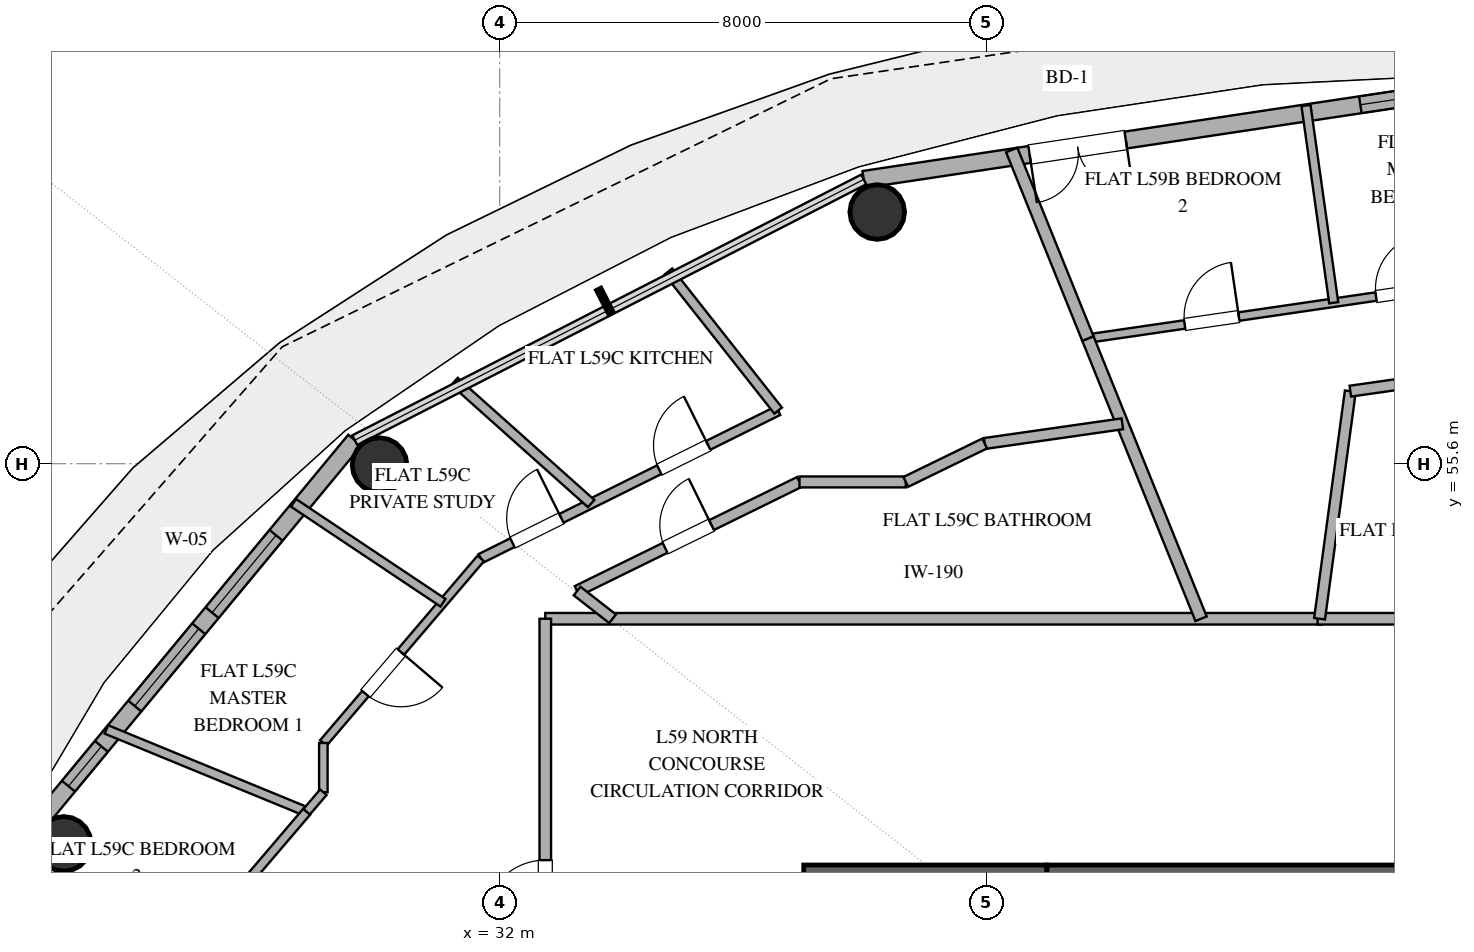
"""IFC4 building model, lengths in metres.
Left out: names, types, materials, properties, quantities, classifications, styles, units other than length and angle.
Written with IfcOpenShell. Run it as: python <this file> out.ifc"""

import sys

from ifc_helpers import new_model, si_unit, direction, frame, frame_2d, origin, origin_2d, place, context, subcontext, project, spatial, rectangle, hollow_circle, extrude, element, fill, save


model = new_model("IFC4")
c1 = context("Model", 3, precision=1e-05, world=origin(), true_north=direction((0.0, 1.0)))
c2 = subcontext(c1, "Body", "Model", "MODEL_VIEW")
j1 = project(units=[si_unit("LENGTHUNIT", "METRE"), si_unit("PLANEANGLEUNIT", "RADIAN")], contexts=[c1])
p1 = place(None, origin())
s1 = spatial("IfcSite", under=j1, at=p1, CompositionType="ELEMENT")
p2 = place(p1, origin())
s2 = spatial("IfcBuilding", under=s1, at=p2, CompositionType="ELEMENT")
p3 = place(p2, frame((0.0, 0.0, 231.6)))
s3 = spatial("IfcBuildingStorey", under=s2, at=p3, CompositionType="ELEMENT", Elevation=231.6)
p4 = place(p3, frame((37.0, 48.8, 0.0), z_axis=(0.0, 0.0, 1.0), x_axis=(1.0, 0.0, 0.0)))
e1 = element("IfcWall", 1, at=p4, inside=s3, PredefinedType="SHEAR", context=c2, shape_type="SweptSolid", body=[
    extrude(rectangle(XDim=4.0, YDim=0.4, at=frame_2d((2.0, 0.0))), origin(), (0.0, 0.0, 1.0), 3.36),
])
p5 = place(p3, frame((41.0, 48.8, 0.0), z_axis=(0.0, 0.0, 1.0), x_axis=(1.0, 0.0, 0.0)))
e2 = element("IfcWall", 2, at=p5, inside=s3, PredefinedType="SHEAR", context=c2, shape_type="SweptSolid", body=[
    extrude(rectangle(XDim=14.0, YDim=0.4, at=frame_2d((7.0, 0.0))), origin(), (0.0, 0.0, 1.0), 3.36),
])
p6 = place(p5, frame((6.1, 0.0, 0.0)))
e3 = element("IfcOpeningElement", 3, at=p6, cuts=e2, PredefinedType="OPENING", context=c2, shape_type="SweptSolid", body=[
    extrude(rectangle(XDim=1.8, YDim=2.25, at=frame_2d((0.9, 1.125))), frame((0.0, 0.21, 0.0), z_axis=(0.0, -1.0, 0.0), x_axis=(1.0, 0.0, 0.0)), (0.0, 0.0, 1.0), 0.42),
])
for number, where, z_axis, x_axis in (
    (4, (38.209, 59.739, 0.0), (0.0, 0.0, 1.0), (1.0, 0.0, 0.0)),
    (5, (30.025, 55.576, 0.0), (0.0, 0.0, 1.0), (1.0, 0.0, 0.0)),
    (6, (24.831, 49.347, 0.0), (0.0, 0.0, 1.0), (1.0, 0.0, 0.0)),
):
    element("IfcColumn", number, at=place(p3, frame(where, z_axis=z_axis, x_axis=x_axis)), inside=s3, PredefinedType="COLUMN", context=c2, shape_type="SweptSolid", body=[
        extrude(hollow_circle(Radius=0.45, WallThickness=0.025, at=origin_2d()), origin(), (0.0, 0.0, 1.0), 3.36),
    ])
p7 = place(p3, frame((48.0, 61.78, 0.0), z_axis=(0.0, 0.0, 1.0), x_axis=(-0.988882522213, -0.148698881169, 0.0)))
e7 = element("IfcWall", 7, at=p7, inside=s3, PredefinedType="SOLIDWALL", context=c2, shape_type="SweptSolid", body=[
    extrude(rectangle(XDim=10.125, YDim=0.28, at=frame_2d((5.062, 0.0))), origin(), (0.0, 0.0, 1.0), 3.36),
])
p8 = place(p7, frame((5.767, 0.0, 0.0)))
e8 = element("IfcOpeningElement", 8, at=p8, cuts=e7, PredefinedType="OPENING", context=c2, shape_type="SweptSolid", body=[
    extrude(rectangle(XDim=1.6, YDim=2.25, at=frame_2d((0.8, 1.125))), frame((0.0, 0.15, 0.0), z_axis=(0.0, -1.0, 0.0), x_axis=(1.0, 0.0, 0.0)), (0.0, 0.0, 1.0), 0.3),
])
p9 = place(p7, frame((0.866, 0.0, 0.85)))
e9 = element("IfcOpeningElement", 9, at=p9, cuts=e7, PredefinedType="OPENING", context=c2, shape_type="SweptSolid", body=[
    extrude(rectangle(XDim=1.0, YDim=1.8, at=frame_2d((0.5, 0.9))), frame((0.0, 0.15, 0.0), z_axis=(0.0, -1.0, 0.0), x_axis=(1.0, 0.0, 0.0)), (0.0, 0.0, 1.0), 0.3),
])
p10 = place(p3, frame((29.617, 55.987, 0.0), z_axis=(0.0, 0.0, 1.0), x_axis=(-0.63761509934, -0.770355103243, 0.0)))
e10 = element("IfcWall", 10, at=p10, inside=s3, PredefinedType="SOLIDWALL", context=c2, shape_type="SweptSolid", body=[
    extrude(rectangle(XDim=8.33, YDim=0.28, at=frame_2d((4.165, 0.0))), origin(), (0.0, 0.0, 1.0), 3.36),
])
p11 = place(p10, frame((2.031, 0.0, 0.85)))
e11 = element("IfcOpeningElement", 11, at=p11, cuts=e10, PredefinedType="OPENING", context=c2, shape_type="SweptSolid", body=[
    extrude(rectangle(XDim=1.65, YDim=2.0, at=frame_2d((0.825, 1.0))), frame((0.0, 0.15, 0.0), z_axis=(0.0, -1.0, 0.0), x_axis=(1.0, 0.0, 0.0)), (0.0, 0.0, 1.0), 0.3),
])
p12 = place(p10, frame((4.025, 0.0, 0.85)))
e12 = element("IfcOpeningElement", 12, at=p12, cuts=e10, PredefinedType="OPENING", context=c2, shape_type="SweptSolid", body=[
    extrude(rectangle(XDim=1.65, YDim=2.0, at=frame_2d((0.825, 1.0))), frame((0.0, 0.15, 0.0), z_axis=(0.0, -1.0, 0.0), x_axis=(1.0, 0.0, 0.0)), (0.0, 0.0, 1.0), 0.3),
])
p13 = place(p10, frame((6.536, 0.0, 0.85)))
e13 = element("IfcOpeningElement", 13, at=p13, cuts=e10, PredefinedType="OPENING", context=c2, shape_type="SweptSolid", body=[
    extrude(rectangle(XDim=0.85, YDim=1.8, at=frame_2d((0.425, 0.9))), frame((0.0, 0.15, 0.0), z_axis=(0.0, -1.0, 0.0), x_axis=(1.0, 0.0, 0.0)), (0.0, 0.0, 1.0), 0.3),
])
p14 = place(p3, frame((32.75, 53.05, 0.0), z_axis=(0.0, 0.0, 1.0), x_axis=(1.0, 0.0, 0.0)))
e14 = element("IfcWall", 14, at=p14, inside=s3, PredefinedType="PARTITIONING", context=c2, shape_type="SweptSolid", body=[
    extrude(rectangle(XDim=12.766, YDim=0.19, at=frame_2d((6.383, 0.0))), origin(), (0.0, 0.0, 1.0), 2.72),
])
p15 = place(p3, frame((32.75, 42.243, 0.0), z_axis=(0.0, 0.0, 1.0), x_axis=(0.0, 1.0, 0.0)))
e15 = element("IfcWall", 15, at=p15, inside=s3, PredefinedType="PARTITIONING", context=c2, shape_type="SweptSolid", body=[
    extrude(rectangle(XDim=10.807, YDim=0.19, at=frame_2d((5.404, 0.0))), origin(), (0.0, 0.0, 1.0), 2.72),
])
p16 = place(p15, frame((5.837, 0.0, 0.0)))
e16 = element("IfcOpeningElement", 16, at=p16, cuts=e15, PredefinedType="OPENING", context=c2, shape_type="SweptSolid", body=[
    extrude(rectangle(XDim=1.0, YDim=2.2, at=frame_2d((0.5, 1.1))), frame((0.0, 0.105, 0.0), z_axis=(0.0, -1.0, 0.0), x_axis=(1.0, 0.0, 0.0)), (0.0, 0.0, 1.0), 0.21),
])
p17 = place(p3, frame((45.452, 53.05, 0.0), z_axis=(0.0, 0.0, 1.0), x_axis=(1.0, 0.0, 0.0)))
e17 = element("IfcWall", 17, at=p17, inside=s3, PredefinedType="PARTITIONING", context=c2, shape_type="SweptSolid", body=[
    extrude(rectangle(XDim=17.798, YDim=0.19, at=frame_2d((8.899, 0.0))), origin(), (0.0, 0.0, 1.0), 2.72),
])
p18 = place(p17, frame((13.381, 0.0, 0.0)))
e18 = element("IfcOpeningElement", 18, at=p18, cuts=e17, PredefinedType="OPENING", context=c2, shape_type="SweptSolid", body=[
    extrude(rectangle(XDim=1.0, YDim=2.2, at=frame_2d((0.5, 1.1))), frame((0.0, 0.105, 0.0), z_axis=(0.0, -1.0, 0.0), x_axis=(1.0, 0.0, 0.0)), (0.0, 0.0, 1.0), 0.21),
])
p19 = place(p17, frame((6.359, 0.0, 0.0)))
e19 = element("IfcOpeningElement", 19, at=p19, cuts=e17, PredefinedType="OPENING", context=c2, shape_type="SweptSolid", body=[
    extrude(rectangle(XDim=1.0, YDim=2.2, at=frame_2d((0.5, 1.1))), frame((0.0, 0.105, 0.0), z_axis=(0.0, -1.0, 0.0), x_axis=(1.0, 0.0, 0.0)), (0.0, 0.0, 1.0), 0.21),
])
p20 = place(p3, frame((41.674, 57.657, 0.0), z_axis=(0.0, 0.0, 1.0), x_axis=(0.989537524877, 0.144275732054, 0.0)))
e20 = element("IfcWall", 20, at=p20, inside=s3, PredefinedType="PARTITIONING", context=c2, shape_type="SweptSolid", body=[
    extrude(rectangle(XDim=6.393, YDim=0.14, at=frame_2d((3.197, 0.0))), origin(), (0.0, 0.0, 1.0), 2.72),
])
p21 = place(p20, frame((1.609, 0.0, 0.0)))
e21 = element("IfcOpeningElement", 21, at=p21, cuts=e20, PredefinedType="OPENING", context=c2, shape_type="SweptSolid", body=[
    extrude(rectangle(XDim=0.9, YDim=2.1, at=frame_2d((0.45, 1.05))), frame((0.0, 0.08, 0.0), z_axis=(0.0, -1.0, 0.0), x_axis=(1.0, 0.0, 0.0)), (0.0, 0.0, 1.0), 0.16),
])
p22 = place(p20, frame((4.789, 0.0, 0.0)))
e22 = element("IfcOpeningElement", 22, at=p22, cuts=e20, PredefinedType="OPENING", context=c2, shape_type="SweptSolid", body=[
    extrude(rectangle(XDim=0.9, YDim=2.1, at=frame_2d((0.45, 1.05))), frame((0.0, 0.08, 0.0), z_axis=(0.0, -1.0, 0.0), x_axis=(1.0, 0.0, 0.0)), (0.0, 0.0, 1.0), 0.16),
])
p23 = place(p3, frame((33.273, 53.506, 0.0), z_axis=(0.0, 0.0, 1.0), x_axis=(0.89778136281, 0.440441397454, 0.0)))
e23 = element("IfcWall", 23, at=p23, inside=s3, PredefinedType="PLUMBINGWALL", context=c2, shape_type="SweptSolid", body=[
    extrude(rectangle(XDim=4.074, YDim=0.18, at=frame_2d((2.037, 0.0))), origin(), (0.0, 0.0, 1.0), 2.72),
])
p24 = place(p23, frame((1.612, 0.0, 0.0)))
e24 = element("IfcOpeningElement", 24, at=p24, cuts=e23, PredefinedType="OPENING", context=c2, shape_type="SweptSolid", body=[
    extrude(rectangle(XDim=0.85, YDim=2.1, at=frame_2d((0.425, 1.05))), frame((0.0, 0.1, 0.0), z_axis=(0.0, -1.0, 0.0), x_axis=(1.0, 0.0, 0.0)), (0.0, 0.0, 1.0), 0.2),
])
p25 = place(p3, frame((45.99, 56.792, 0.0), z_axis=(0.0, 0.0, 1.0), x_axis=(-0.134013985284, -0.990979440628, 0.0)))
e25 = element("IfcWall", 25, at=p25, inside=s3, PredefinedType="PLUMBINGWALL", context=c2, shape_type="SweptSolid", body=[
    extrude(rectangle(XDim=3.777, YDim=0.18, at=frame_2d((1.888, 0.0))), origin(), (0.0, 0.0, 1.0), 2.72),
])
p26 = place(p3, frame((25.531, 51.229, 0.0), z_axis=(0.0, 0.0, 1.0), x_axis=(0.925009924445, -0.37994294266, 0.0)))
e26 = element("IfcWall", 26, at=p26, inside=s3, PredefinedType="PARTITIONING", context=c2, shape_type="SweptSolid", body=[
    extrude(rectangle(XDim=3.562, YDim=0.15, at=frame_2d((1.781, 0.0))), origin(), (0.0, 0.0, 1.0), 2.72),
])
p27 = place(p3, frame((31.689, 54.042, 0.0), z_axis=(0.0, 0.0, 1.0), x_axis=(0.895479575413, 0.445102606168, 0.0)))
e27 = element("IfcWall", 27, at=p27, inside=s3, PredefinedType="PLUMBINGWALL", context=c2, shape_type="SweptSolid", body=[
    extrude(rectangle(XDim=5.462, YDim=0.16, at=frame_2d((2.731, 0.0))), origin(), (0.0, 0.0, 1.0), 2.72),
])
p28 = place(p27, frame((3.278, 0.0, 0.0)))
e28 = element("IfcOpeningElement", 28, at=p28, cuts=e27, PredefinedType="OPENING", context=c2, shape_type="SweptSolid", body=[
    extrude(rectangle(XDim=0.9, YDim=2.1, at=frame_2d((0.45, 1.05))), frame((0.0, 0.09, 0.0), z_axis=(0.0, -1.0, 0.0), x_axis=(1.0, 0.0, 0.0)), (0.0, 0.0, 1.0), 0.18),
])
p29 = place(p27, frame((0.581, 0.0, 0.0)))
e29 = element("IfcOpeningElement", 29, at=p29, cuts=e27, PredefinedType="OPENING", context=c2, shape_type="SweptSolid", body=[
    extrude(rectangle(XDim=0.9, YDim=2.1, at=frame_2d((0.45, 1.05))), frame((0.0, 0.09, 0.0), z_axis=(0.0, -1.0, 0.0), x_axis=(1.0, 0.0, 0.0)), (0.0, 0.0, 1.0), 0.18),
])
p30 = place(p3, frame((41.674, 57.657, 0.0), z_axis=(0.0, 0.0, 1.0), x_axis=(0.374573524941, -0.927197214412, 0.0)))
e30 = element("IfcWall", 30, at=p30, inside=s3, PredefinedType="PARTITIONING", context=c2, shape_type="SweptSolid", body=[
    extrude(rectangle(XDim=4.969, YDim=0.2, at=frame_2d((2.485, 0.0))), origin(), (0.0, 0.0, 1.0), 2.72),
])
p31 = place(p3, frame((41.674, 57.657, 0.0), z_axis=(0.0, 0.0, 1.0), x_axis=(-0.374572886439, 0.927197472357, 0.0)))
e31 = element("IfcWall", 31, at=p31, inside=s3, PredefinedType="PARTITIONING", context=c2, shape_type="SweptSolid", body=[
    extrude(rectangle(XDim=3.344, YDim=0.2, at=frame_2d((1.672, 0.0))), origin(), (0.0, 0.0, 1.0), 2.72),
])
p32 = place(p3, frame((45.717, 58.247, 0.0), z_axis=(0.0, 0.0, 1.0), x_axis=(-0.139134872395, 0.990273440664, 0.0)))
e32 = element("IfcWall", 32, at=p32, inside=s3, PredefinedType="PARTITIONING", context=c2, shape_type="SweptSolid", body=[
    extrude(rectangle(XDim=3.274, YDim=0.15, at=frame_2d((1.637, 0.0))), origin(), (0.0, 0.0, 1.0), 2.72),
])
p33 = place(p3, frame((31.689, 54.042, 0.0), z_axis=(0.0, 0.0, 1.0), x_axis=(-0.648985159088, -0.760801066826, 0.0)))
e33 = element("IfcWall", 33, at=p33, inside=s3, PredefinedType="PARTITIONING", context=c2, shape_type="SweptSolid", body=[
    extrude(rectangle(XDim=3.989, YDim=0.14, at=frame_2d((1.995, 0.0))), origin(), (0.0, 0.0, 1.0), 2.72),
])
p34 = place(p33, frame((2.023, 0.0, 0.0)))
e34 = element("IfcOpeningElement", 34, at=p34, cuts=e33, PredefinedType="OPENING", context=c2, shape_type="SweptSolid", body=[
    extrude(rectangle(XDim=0.9, YDim=2.1, at=frame_2d((0.45, 1.05))), frame((0.0, 0.08, 0.0), z_axis=(0.0, -1.0, 0.0), x_axis=(1.0, 0.0, 0.0)), (0.0, 0.0, 1.0), 0.16),
])
p35 = place(p3, frame((33.505, 54.945, 0.0), z_axis=(0.0, 0.0, 1.0), x_axis=(-0.745914664094, 0.66604152565, 0.0)))
e35 = element("IfcWall", 35, at=p35, inside=s3, PredefinedType="PLUMBINGWALL", context=c2, shape_type="SweptSolid", body=[
    extrude(rectangle(XDim=3.014, YDim=0.16, at=frame_2d((1.507, 0.0))), origin(), (0.0, 0.0, 1.0), 2.72),
])
p36 = place(p3, frame((28.609, 54.956, 0.0), z_axis=(0.0, 0.0, 1.0), x_axis=(0.831478101563, -0.555557527733, 0.0)))
e36 = element("IfcWall", 36, at=p36, inside=s3, PredefinedType="PARTITIONING", context=c2, shape_type="SweptSolid", body=[
    extrude(rectangle(XDim=2.956, YDim=0.15, at=frame_2d((1.478, 0.0))), origin(), (0.0, 0.0, 1.0), 2.72),
])
p37 = place(p3, frame((36.58, 56.473, 0.0), z_axis=(0.0, 0.0, 1.0), x_axis=(-0.619378047354, 0.785092882694, 0.0)))
e37 = element("IfcWall", 37, at=p37, inside=s3, PredefinedType="PLUMBINGWALL", context=c2, shape_type="SweptSolid", body=[
    extrude(rectangle(XDim=2.914, YDim=0.16, at=frame_2d((1.457, 0.0))), origin(), (0.0, 0.0, 1.0), 2.72),
])
p38 = place(p3, frame((39.976, 55.932, 0.0), z_axis=(0.0, 0.0, 1.0), x_axis=(0.989917445937, 0.141645509032, 0.0)))
e38 = element("IfcWall", 38, at=p38, inside=s3, PredefinedType="PLUMBINGWALL", context=c2, shape_type="SweptSolid", body=[
    extrude(rectangle(XDim=2.287, YDim=0.18, at=frame_2d((1.144, 0.0))), origin(), (0.0, 0.0, 1.0), 2.72),
])
p39 = place(p3, frame((48.0, 57.08, 0.0), z_axis=(0.0, 0.0, 1.0), x_axis=(-0.989918207634, -0.141640185666, 0.0)))
e39 = element("IfcWall", 39, at=p39, inside=s3, PredefinedType="PLUMBINGWALL", context=c2, shape_type="SweptSolid", body=[
    extrude(rectangle(XDim=2.031, YDim=0.18, at=frame_2d((1.015, 0.0))), origin(), (0.0, 0.0, 1.0), 2.72),
])
p40 = place(p3, frame((28.826, 49.876, 0.0), z_axis=(0.0, 0.0, 1.0), x_axis=(-0.649252114502, -0.760573265251, 0.0)))
e40 = element("IfcWall", 40, at=p40, inside=s3, PredefinedType="PARTITIONING", context=c2, shape_type="SweptSolid", body=[
    extrude(rectangle(XDim=2.013, YDim=0.15, at=frame_2d((1.007, 0.0))), origin(), (0.0, 0.0, 1.0), 2.72),
])
p41 = place(p3, frame((36.931, 55.3, 0.0), z_axis=(0.0, 0.0, 1.0), x_axis=(1.0, 0.0, 0.0)))
e41 = element("IfcWall", 41, at=p41, inside=s3, PredefinedType="PLUMBINGWALL", context=c2, shape_type="SweptSolid", body=[
    extrude(rectangle(XDim=1.748, YDim=0.18, at=frame_2d((0.874, 0.0))), origin(), (0.0, 0.0, 1.0), 2.72),
])
p42 = place(p3, frame((38.679, 55.3, 0.0), z_axis=(0.0, 0.0, 1.0), x_axis=(0.898916394035, 0.438120207861, 0.0)))
e42 = element("IfcWall", 42, at=p42, inside=s3, PredefinedType="PLUMBINGWALL", context=c2, shape_type="SweptSolid", body=[
    extrude(rectangle(XDim=1.443, YDim=0.18, at=frame_2d((0.721, 0.0))), origin(), (0.0, 0.0, 1.0), 2.72),
])
p43 = place(p3, frame((29.1, 51.007, 0.0), z_axis=(0.0, 0.0, 1.0), x_axis=(0.0, -1.0, 0.0)))
e43 = element("IfcWall", 43, at=p43, inside=s3, PredefinedType="PARTITIONING", context=c2, shape_type="SweptSolid", body=[
    extrude(rectangle(XDim=0.81, YDim=0.14, at=frame_2d((0.405, 0.0))), origin(), (0.0, 0.0, 1.0), 2.72),
])
p44 = place(p3, frame((33.857, 53.05, 0.0), z_axis=(0.0, 0.0, 1.0), x_axis=(-0.788214334349, 0.615400815019, 0.0)))
e44 = element("IfcWall", 44, at=p44, inside=s3, PredefinedType="PLUMBINGWALL", context=c2, shape_type="SweptSolid", body=[
    extrude(rectangle(XDim=0.74, YDim=0.18, at=frame_2d((0.37, 0.0))), origin(), (0.0, 0.0, 1.0), 2.72),
])
p45 = place(p3, frame((29.1, 50.197, 0.0), z_axis=(0.0, 0.0, 1.0), x_axis=(-0.649360360175, -0.760480849617, 0.0)))
e45 = element("IfcWall", 45, at=p45, inside=s3, PredefinedType="PARTITIONING", context=c2, shape_type="SweptSolid", body=[
    extrude(rectangle(XDim=0.422, YDim=0.14, at=frame_2d((0.211, 0.0))), origin(), (0.0, 0.0, 1.0), 2.72),
])
p46 = place(p8, origin())
e46 = element("IfcDoor", 46, at=p46, inside=s3, OperationType="DOUBLE_DOOR_SINGLE_SWING", PredefinedType="DOOR", context=c2, shape_type="SweptSolid", body=[
    extrude(rectangle(XDim=1.6, YDim=2.25, at=frame_2d((0.8, 1.125))), frame((0.0, 0.025, 0.0), z_axis=(0.0, -1.0, 0.0), x_axis=(1.0, 0.0, 0.0)), (0.0, 0.0, 1.0), 0.05),
])
fill(e8, e46)
p47 = place(p11, origin())
e47 = element("IfcWindow", 47, at=p47, inside=s3, PartitioningType="SINGLE_PANEL", PredefinedType="WINDOW", context=c2, shape_type="SweptSolid", body=[
    extrude(rectangle(XDim=1.65, YDim=2.0, at=frame_2d((0.825, 1.0))), frame((0.0, 0.03, 0.0), z_axis=(0.0, -1.0, 0.0), x_axis=(1.0, 0.0, 0.0)), (0.0, 0.0, 1.0), 0.06),
])
fill(e11, e47)
p48 = place(p12, origin())
e48 = element("IfcWindow", 48, at=p48, inside=s3, PartitioningType="SINGLE_PANEL", PredefinedType="WINDOW", context=c2, shape_type="SweptSolid", body=[
    extrude(rectangle(XDim=1.65, YDim=2.0, at=frame_2d((0.825, 1.0))), frame((0.0, 0.03, 0.0), z_axis=(0.0, -1.0, 0.0), x_axis=(1.0, 0.0, 0.0)), (0.0, 0.0, 1.0), 0.06),
])
fill(e12, e48)
p49 = place(p9, origin())
e49 = element("IfcWindow", 49, at=p49, inside=s3, PartitioningType="SINGLE_PANEL", PredefinedType="WINDOW", context=c2, shape_type="SweptSolid", body=[
    extrude(rectangle(XDim=1.0, YDim=1.8, at=frame_2d((0.5, 0.9))), frame((0.0, 0.03, 0.0), z_axis=(0.0, -1.0, 0.0), x_axis=(1.0, 0.0, 0.0)), (0.0, 0.0, 1.0), 0.06),
])
fill(e9, e49)
p50 = place(p13, origin())
e50 = element("IfcWindow", 50, at=p50, inside=s3, PartitioningType="SINGLE_PANEL", PredefinedType="WINDOW", context=c2, shape_type="SweptSolid", body=[
    extrude(rectangle(XDim=0.85, YDim=1.8, at=frame_2d((0.425, 0.9))), frame((0.0, 0.03, 0.0), z_axis=(0.0, -1.0, 0.0), x_axis=(1.0, 0.0, 0.0)), (0.0, 0.0, 1.0), 0.06),
])
fill(e13, e50)
p51 = place(p16, origin())
e51 = element("IfcDoor", 51, at=p51, inside=s3, OperationType="SINGLE_SWING_LEFT", PredefinedType="DOOR", context=c2, shape_type="SweptSolid", body=[
    extrude(rectangle(XDim=1.0, YDim=2.2, at=frame_2d((0.5, 1.1))), frame((0.0, 0.025, 0.0), z_axis=(0.0, -1.0, 0.0), x_axis=(1.0, 0.0, 0.0)), (0.0, 0.0, 1.0), 0.05),
])
fill(e16, e51)
p52 = place(p21, origin())
e52 = element("IfcDoor", 52, at=p52, inside=s3, OperationType="SINGLE_SWING_RIGHT", PredefinedType="DOOR", context=c2, shape_type="SweptSolid", body=[
    extrude(rectangle(XDim=0.9, YDim=2.1, at=frame_2d((0.45, 1.05))), frame((0.0, 0.025, 0.0), z_axis=(0.0, -1.0, 0.0), x_axis=(1.0, 0.0, 0.0)), (0.0, 0.0, 1.0), 0.05),
])
fill(e21, e52)
p53 = place(p22, origin())
e53 = element("IfcDoor", 53, at=p53, inside=s3, OperationType="SINGLE_SWING_RIGHT", PredefinedType="DOOR", context=c2, shape_type="SweptSolid", body=[
    extrude(rectangle(XDim=0.9, YDim=2.1, at=frame_2d((0.45, 1.05))), frame((0.0, 0.025, 0.0), z_axis=(0.0, -1.0, 0.0), x_axis=(1.0, 0.0, 0.0)), (0.0, 0.0, 1.0), 0.05),
])
fill(e22, e53)
p54 = place(p24, origin())
e54 = element("IfcDoor", 54, at=p54, inside=s3, OperationType="SINGLE_SWING_RIGHT", PredefinedType="DOOR", context=c2, shape_type="SweptSolid", body=[
    extrude(rectangle(XDim=0.85, YDim=2.1, at=frame_2d((0.425, 1.05))), frame((0.0, 0.025, 0.0), z_axis=(0.0, -1.0, 0.0), x_axis=(1.0, 0.0, 0.0)), (0.0, 0.0, 1.0), 0.05),
])
fill(e24, e54)
p55 = place(p28, origin())
e55 = element("IfcDoor", 55, at=p55, inside=s3, OperationType="SINGLE_SWING_RIGHT", PredefinedType="DOOR", context=c2, shape_type="SweptSolid", body=[
    extrude(rectangle(XDim=0.9, YDim=2.1, at=frame_2d((0.45, 1.05))), frame((0.0, 0.025, 0.0), z_axis=(0.0, -1.0, 0.0), x_axis=(1.0, 0.0, 0.0)), (0.0, 0.0, 1.0), 0.05),
])
fill(e28, e55)
p56 = place(p29, origin())
e56 = element("IfcDoor", 56, at=p56, inside=s3, OperationType="SINGLE_SWING_RIGHT", PredefinedType="DOOR", context=c2, shape_type="SweptSolid", body=[
    extrude(rectangle(XDim=0.9, YDim=2.1, at=frame_2d((0.45, 1.05))), frame((0.0, 0.025, 0.0), z_axis=(0.0, -1.0, 0.0), x_axis=(1.0, 0.0, 0.0)), (0.0, 0.0, 1.0), 0.05),
])
fill(e29, e56)
p57 = place(p34, origin())
e57 = element("IfcDoor", 57, at=p57, inside=s3, OperationType="SINGLE_SWING_LEFT", PredefinedType="DOOR", context=c2, shape_type="SweptSolid", body=[
    extrude(rectangle(XDim=0.9, YDim=2.1, at=frame_2d((0.45, 1.05))), frame((0.0, 0.025, 0.0), z_axis=(0.0, -1.0, 0.0), x_axis=(1.0, 0.0, 0.0)), (0.0, 0.0, 1.0), 0.05),
])
fill(e34, e57)
save(model, sys.argv[1])
